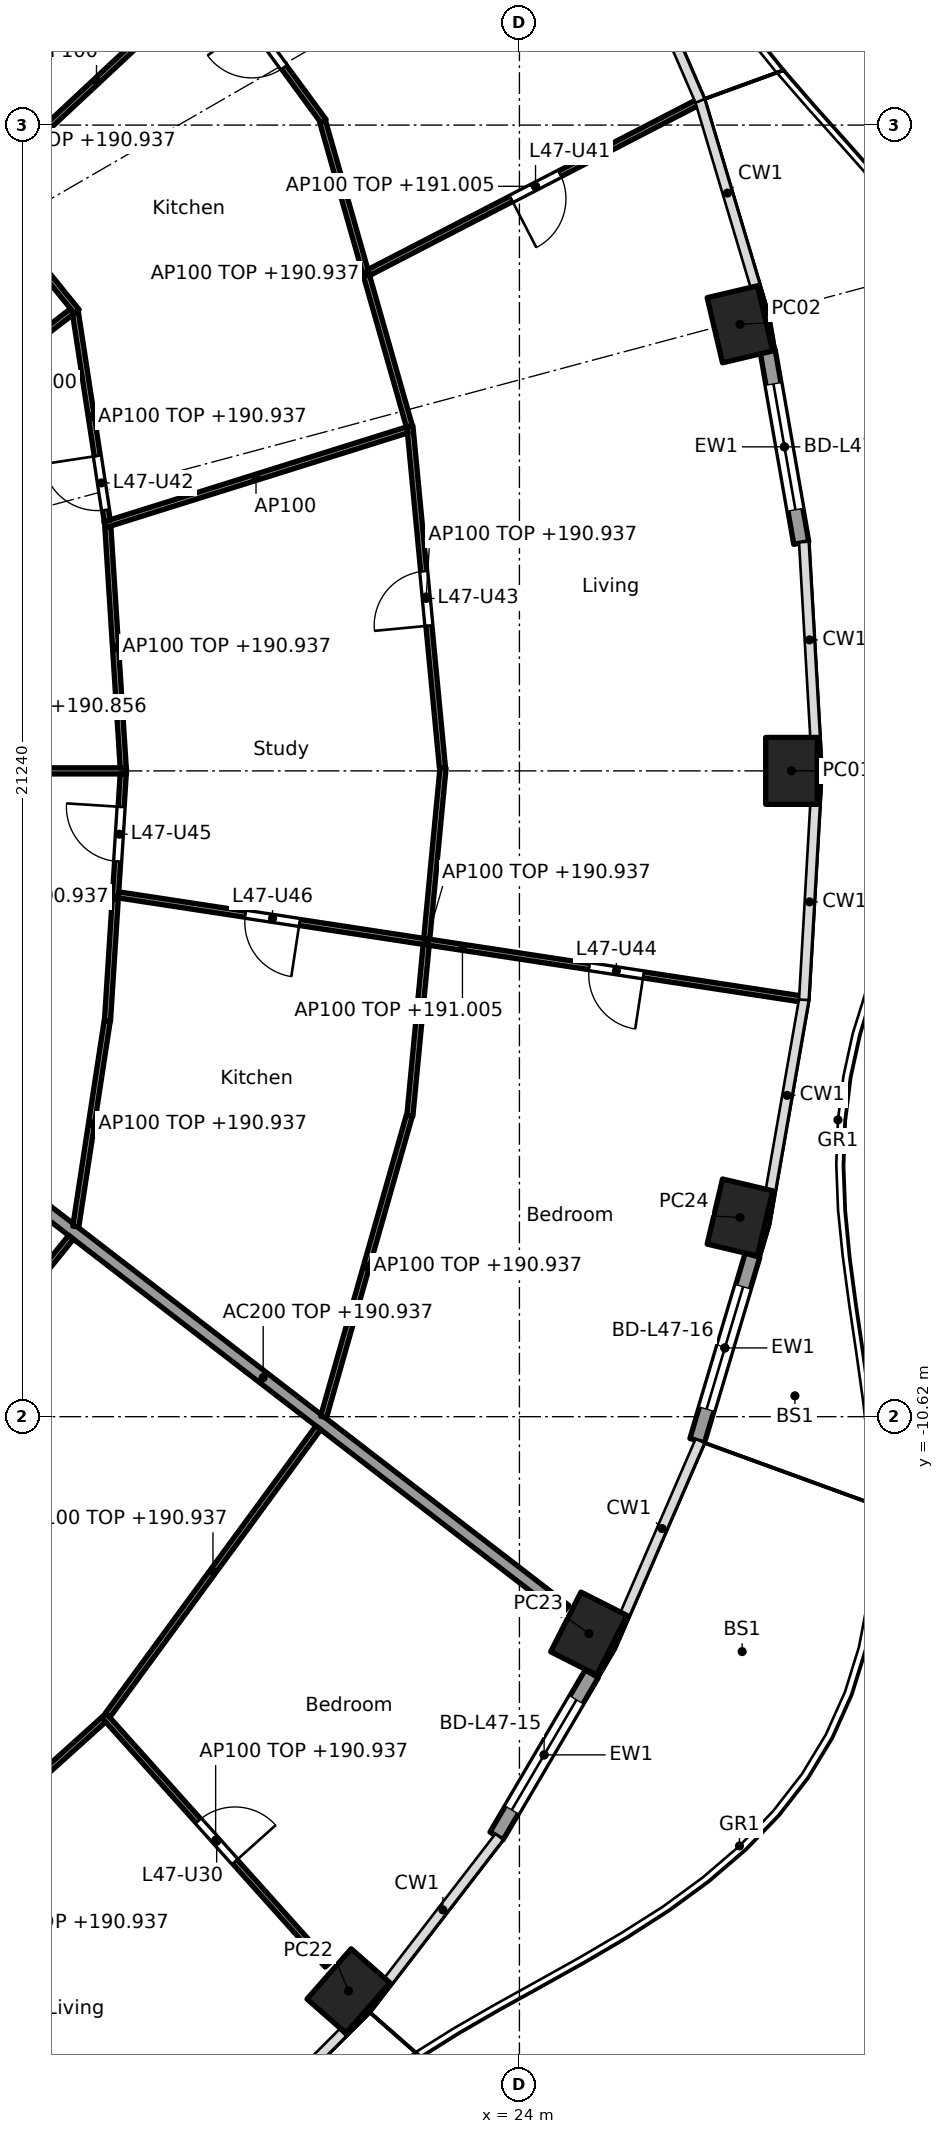
"""IFC4 building model, lengths in metres.
Left out: names, types, materials, properties, quantities, classifications, styles, units other than length and angle.
Written with IfcOpenShell. Run it as: python <this file> out.ifc"""

import sys

from ifc_helpers import new_model, si_unit, direction, frame, frame_2d, origin, origin_2d, place, context, subcontext, project, spatial, rectangle, hollow_rectangle, extrude, element, fill, save


model = new_model("IFC4")
c1 = context("Model", 3, precision=1e-05, world=origin(), true_north=direction((0.0, 1.0)))
c2 = subcontext(c1, "Body", "Model", "MODEL_VIEW")
j1 = project(units=[si_unit("LENGTHUNIT", "METRE"), si_unit("PLANEANGLEUNIT", "RADIAN")], contexts=[c1])
p1 = place(None, origin())
s1 = spatial("IfcSite", under=j1, at=p1, CompositionType="ELEMENT")
p2 = place(p1, origin())
s2 = spatial("IfcBuilding", under=s1, at=p2, CompositionType="ELEMENT")
p3 = place(p2, frame((0.0, 0.0, 188.1)))
s3 = spatial("IfcBuildingStorey", under=s2, at=p3, CompositionType="ELEMENT", Elevation=188.1)
for number, where, z_axis, x_axis in (
    (1, (28.475, 0.0, 0.0), (0.0, 0.0, 1.0), (0.0, 1.0, 0.0)),
    (2, (27.627, 7.344, 0.0), (0.0, 0.0, 1.0), (-0.229, 0.973, 0.0)),
    (3, (21.189, -20.064, 0.0), (0.0, 0.0, 1.0), (0.66, 0.751, 0.0)),
    (4, (25.142, -14.188, 0.0), (0.0, 0.0, 1.0), (0.452, 0.892, 0.0)),
    (5, (27.627, -7.344, 0.0), (0.0, 0.0, 1.0), (0.229, 0.973, 0.0)),
):
    element("IfcColumn", number, at=place(p3, frame(where, z_axis=z_axis, x_axis=x_axis)), inside=s3, PredefinedType="COLUMN", context=c2, shape_type="SweptSolid", body=[
        extrude(hollow_rectangle(XDim=1.1, YDim=0.85, WallThickness=0.036, at=origin_2d()), origin(), (0.0, 0.0, 1.0), 3.7),
    ])
p4 = place(p3, frame((28.082, 6.91, 0.0), z_axis=(0.0, 0.0, 1.0), x_axis=(0.172149769468, -0.985070787747, 0.0)))
e6 = element("IfcWall", 6, at=p4, inside=s3, PredefinedType="SOLIDWALL", context=c2, shape_type="SweptSolid", body=[
    extrude(rectangle(XDim=3.211, YDim=0.25, at=frame_2d((1.605, 0.0))), origin(), (0.0, 0.0, 1.0), 3.44),
])
p5 = place(p4, frame((0.555, 0.0, 0.0)))
e7 = element("IfcOpeningElement", 7, at=p5, cuts=e6, PredefinedType="OPENING", context=c2, shape_type="SweptSolid", body=[
    extrude(rectangle(XDim=2.1, YDim=2.4, at=frame_2d((1.05, 1.2))), frame((0.0, 0.135, 0.0), z_axis=(0.0, -1.0, 0.0), x_axis=(1.0, 0.0, 0.0)), (0.0, 0.0, 1.0), 0.27),
])
p6 = place(p3, frame((25.189, -14.848, 0.0), z_axis=(0.0, 0.0, 1.0), x_axis=(-0.506367803691, -0.862317602386, 0.0)))
e8 = element("IfcWall", 8, at=p6, inside=s3, PredefinedType="SOLIDWALL", context=c2, shape_type="SweptSolid", body=[
    extrude(rectangle(XDim=3.092, YDim=0.25, at=frame_2d((1.546, 0.0))), origin(), (0.0, 0.0, 1.0), 3.44),
])
p7 = place(p6, frame((0.496, 0.0, 0.0)))
e9 = element("IfcOpeningElement", 9, at=p7, cuts=e8, PredefinedType="OPENING", context=c2, shape_type="SweptSolid", body=[
    extrude(rectangle(XDim=2.1, YDim=2.4, at=frame_2d((1.05, 1.2))), frame((0.0, 0.135, 0.0), z_axis=(0.0, -1.0, 0.0), x_axis=(1.0, 0.0, 0.0)), (0.0, 0.0, 1.0), 0.27),
])
p8 = place(p3, frame((27.833, -7.965, 0.0), z_axis=(0.0, 0.0, 1.0), x_axis=(-0.28584838049, -0.958274857946, 0.0)))
e10 = element("IfcWall", 10, at=p8, inside=s3, PredefinedType="SOLIDWALL", context=c2, shape_type="SweptSolid", body=[
    extrude(rectangle(XDim=3.182, YDim=0.25, at=frame_2d((1.591, 0.0))), origin(), (0.0, 0.0, 1.0), 3.44),
])
p9 = place(p8, frame((0.541, 0.0, 0.0)))
e11 = element("IfcOpeningElement", 11, at=p9, cuts=e10, PredefinedType="OPENING", context=c2, shape_type="SweptSolid", body=[
    extrude(rectangle(XDim=2.1, YDim=2.4, at=frame_2d((1.05, 1.2))), frame((0.0, 0.135, 0.0), z_axis=(0.0, -1.0, 0.0), x_axis=(1.0, 0.0, 0.0)), (0.0, 0.0, 1.0), 0.27),
])
p10 = place(p3, frame((14.822, -6.154, 0.0), z_axis=(0.0, 0.0, 1.0), x_axis=(0.792203056092, -0.610257583254, 0.0)))
e12 = element("IfcWall", 12, at=p10, inside=s3, PredefinedType="PARTITIONING", context=c2, shape_type="SweptSolid", body=[
    extrude(rectangle(XDim=12.533, YDim=0.2, at=frame_2d((6.266, 0.0))), origin(), (0.0, 0.0, 1.0), 2.837),
])
p11 = place(p3, frame((12.665, 0.0, 0.0), z_axis=(0.0, 0.0, 1.0), x_axis=(1.0, 0.0, 0.0)))
e13 = element("IfcWall", 13, at=p11, inside=s3, PredefinedType="PARTITIONING", context=c2, shape_type="SweptSolid", body=[
    extrude(rectangle(XDim=4.873, YDim=0.1, at=frame_2d((2.437, 0.0))), origin(), (0.0, 0.0, 1.0), 2.756),
])
p12 = place(p3, frame((17.485, 0.05, 0.0), z_axis=(0.0, 0.0, 1.0), x_axis=(-0.063679314345, 0.99797041285, 0.0)))
e14 = element("IfcWall", 14, at=p12, inside=s3, PredefinedType="PARTITIONING", context=c2, shape_type="SweptSolid", body=[
    extrude(rectangle(XDim=3.972, YDim=0.1, at=frame_2d((1.986, 0.0))), origin(), (0.0, 0.0, 1.0), 2.837),
])
p13 = place(p3, frame((17.485, -0.05, 0.0), z_axis=(0.0, 0.0, 1.0), x_axis=(-0.063673473968, -0.997970785501, 0.0)))
e15 = element("IfcWall", 15, at=p13, inside=s3, PredefinedType="PARTITIONING", context=c2, shape_type="SweptSolid", body=[
    extrude(rectangle(XDim=4.072, YDim=0.1, at=frame_2d((2.036, 0.0))), origin(), (0.0, 0.0, 1.0), 2.837),
])
p14 = place(p13, frame((0.543, 0.0, 0.0)))
e16 = element("IfcOpeningElement", 16, at=p14, cuts=e15, PredefinedType="OPENING", context=c2, shape_type="SweptSolid", body=[
    extrude(rectangle(XDim=0.9, YDim=2.1, at=frame_2d((0.45, 1.05))), frame((0.0, 0.06, 0.0), z_axis=(0.0, -1.0, 0.0), x_axis=(1.0, 0.0, 0.0)), (0.0, 0.0, 1.0), 0.12),
])
p15 = place(p3, frame((22.734, 0.05, 0.0), z_axis=(0.0, 0.0, 1.0), x_axis=(-0.0949274088, 0.995484197292, 0.0)))
e17 = element("IfcWall", 17, at=p15, inside=s3, PredefinedType="PARTITIONING", context=c2, shape_type="SweptSolid", body=[
    extrude(rectangle(XDim=5.648, YDim=0.1, at=frame_2d((2.824, 0.0))), origin(), (0.0, 0.0, 1.0), 2.837),
])
p16 = place(p15, frame((2.349, 0.0, 0.0)))
e18 = element("IfcOpeningElement", 18, at=p16, cuts=e17, PredefinedType="OPENING", context=c2, shape_type="SweptSolid", body=[
    extrude(rectangle(XDim=0.9, YDim=2.1, at=frame_2d((0.45, 1.05))), frame((0.0, 0.06, 0.0), z_axis=(0.0, -1.0, 0.0), x_axis=(1.0, 0.0, 0.0)), (0.0, 0.0, 1.0), 0.12),
])
p17 = place(p3, frame((22.744, 0.05, 0.0), z_axis=(0.0, 0.0, 1.0), x_axis=(-0.094931362305, -0.995483820286, 0.0)))
e19 = element("IfcWall", 19, at=p17, inside=s3, PredefinedType="PARTITIONING", context=c2, shape_type="SweptSolid", body=[
    extrude(rectangle(XDim=5.748, YDim=0.1, at=frame_2d((2.874, 0.0))), origin(), (0.0, 0.0, 1.0), 2.837),
])
p18 = place(p3, frame((17.181, 4.049, 0.0), z_axis=(0.0, 0.0, 1.0), x_axis=(0.954246359918, 0.299021545351, 0.0)))
e20 = element("IfcWall", 20, at=p18, inside=s3, PredefinedType="PARTITIONING", context=c2, shape_type="SweptSolid", body=[
    extrude(rectangle(XDim=5.213, YDim=0.1, at=frame_2d((2.606, 0.0))), origin(), (0.0, 0.0, 1.0), 3.44),
])
p19 = place(p3, frame((17.221, 4.113, 0.0), z_axis=(0.0, 0.0, 1.0), x_axis=(-0.151078880423, 0.988521710379, 0.0)))
e21 = element("IfcWall", 21, at=p19, inside=s3, PredefinedType="PARTITIONING", context=c2, shape_type="SweptSolid", body=[
    extrude(rectangle(XDim=3.469, YDim=0.1, at=frame_2d((1.735, 0.0))), origin(), (0.0, 0.0, 1.0), 2.837),
])
p20 = place(p19, frame((0.18, 0.0, 0.0)))
e22 = element("IfcOpeningElement", 22, at=p20, cuts=e21, PredefinedType="OPENING", context=c2, shape_type="SweptSolid", body=[
    extrude(rectangle(XDim=0.9, YDim=2.1, at=frame_2d((0.45, 1.05))), frame((0.0, 0.06, 0.0), z_axis=(0.0, -1.0, 0.0), x_axis=(1.0, 0.0, 0.0)), (0.0, 0.0, 1.0), 0.12),
])
p21 = place(p3, frame((22.189, 5.67, 0.0), z_axis=(0.0, 0.0, 1.0), x_axis=(-0.273815967041, 0.961782104322, 0.0)))
e23 = element("IfcWall", 23, at=p21, inside=s3, PredefinedType="PARTITIONING", context=c2, shape_type="SweptSolid", body=[
    extrude(rectangle(XDim=5.202, YDim=0.1, at=frame_2d((2.601, 0.0))), origin(), (0.0, 0.0, 1.0), 2.837),
])
p22 = place(p3, frame((21.522, 8.195, 0.0), z_axis=(0.0, 0.0, 1.0), x_axis=(0.888281046031, 0.459300319249, 0.0)))
e24 = element("IfcWall", 24, at=p22, inside=s3, PredefinedType="PARTITIONING", context=c2, shape_type="SweptSolid", body=[
    extrude(rectangle(XDim=6.176, YDim=0.1, at=frame_2d((3.088, 0.0))), origin(), (0.0, 0.0, 1.0), 2.905),
])
p23 = place(p22, frame((2.638, 0.0, 0.0)))
e25 = element("IfcOpeningElement", 25, at=p23, cuts=e24, PredefinedType="OPENING", context=c2, shape_type="SweptSolid", body=[
    extrude(rectangle(XDim=0.9, YDim=2.1, at=frame_2d((0.45, 1.05))), frame((0.0, 0.06, 0.0), z_axis=(0.0, -1.0, 0.0), x_axis=(1.0, 0.0, 0.0)), (0.0, 0.0, 1.0), 0.12),
])
p24 = place(p3, frame((14.822, 6.154, 0.0), z_axis=(0.0, 0.0, 1.0), x_axis=(0.792226528082, 0.610227111987, 0.0)))
e26 = element("IfcWall", 26, at=p24, inside=s3, PredefinedType="PARTITIONING", context=c2, shape_type="SweptSolid", body=[
    extrude(rectangle(XDim=2.307, YDim=0.1, at=frame_2d((1.154, 0.0))), origin(), (0.0, 0.0, 1.0), 3.44),
])
p25 = place(p3, frame((16.721, 7.553, 0.0), z_axis=(0.0, 0.0, 1.0), x_axis=(-0.628753513808, 0.777604667472, 0.0)))
e27 = element("IfcWall", 27, at=p25, inside=s3, PredefinedType="PARTITIONING", context=c2, shape_type="SweptSolid", body=[
    extrude(rectangle(XDim=5.007, YDim=0.1, at=frame_2d((2.504, 0.0))), origin(), (0.0, 0.0, 1.0), 2.837),
])
p26 = place(p3, frame((20.781, 10.681, 0.0), z_axis=(0.0, 0.0, 1.0), x_axis=(-0.591117075283, 0.806585769345, 0.0)))
e28 = element("IfcWall", 28, at=p26, inside=s3, PredefinedType="PARTITIONING", context=c2, shape_type="SweptSolid", body=[
    extrude(rectangle(XDim=6.01, YDim=0.1, at=frame_2d((3.005, 0.0))), origin(), (0.0, 0.0, 1.0), 2.837),
])
p27 = place(p26, frame((1.103, 0.0, 0.0)))
e29 = element("IfcOpeningElement", 29, at=p27, cuts=e28, PredefinedType="OPENING", context=c2, shape_type="SweptSolid", body=[
    extrude(rectangle(XDim=0.9, YDim=2.1, at=frame_2d((0.45, 1.05))), frame((0.0, 0.06, 0.0), z_axis=(0.0, -1.0, 0.0), x_axis=(1.0, 0.0, 0.0)), (0.0, 0.0, 1.0), 0.12),
])
p28 = place(p3, frame((15.152, 9.573, 0.0), z_axis=(0.0, 0.0, 1.0), x_axis=(0.730723083214, 0.682673989294, 0.0)))
e30 = element("IfcWall", 30, at=p28, inside=s3, PredefinedType="PARTITIONING", context=c2, shape_type="SweptSolid", body=[
    extrude(rectangle(XDim=5.183, YDim=0.1, at=frame_2d((2.591, 0.0))), origin(), (0.0, 0.0, 1.0), 3.44),
])
p29 = place(p3, frame((10.178, 7.732, 0.0), z_axis=(0.0, 0.0, 1.0), x_axis=(0.667280084362, 0.744806880348, 0.0)))
e31 = element("IfcWall", 31, at=p29, inside=s3, PredefinedType="PARTITIONING", context=c2, shape_type="SweptSolid", body=[
    extrude(rectangle(XDim=10.572, YDim=0.1, at=frame_2d((5.286, 0.0))), origin(), (0.0, 0.0, 1.0), 2.756),
])
p30 = place(p29, frame((2.07, 0.0, 0.0)))
e32 = element("IfcOpeningElement", 32, at=p30, cuts=e31, PredefinedType="OPENING", context=c2, shape_type="SweptSolid", body=[
    extrude(rectangle(XDim=0.9, YDim=2.1, at=frame_2d((0.45, 1.05))), frame((0.0, 0.06, 0.0), z_axis=(0.0, -1.0, 0.0), x_axis=(1.0, 0.0, 0.0)), (0.0, 0.0, 1.0), 0.12),
])
p31 = place(p29, frame((7.331, 0.0, 0.0)))
e33 = element("IfcOpeningElement", 33, at=p31, cuts=e31, PredefinedType="OPENING", context=c2, shape_type="SweptSolid", body=[
    extrude(rectangle(XDim=0.9, YDim=2.1, at=frame_2d((0.45, 1.05))), frame((0.0, 0.06, 0.0), z_axis=(0.0, -1.0, 0.0), x_axis=(1.0, 0.0, 0.0)), (0.0, 0.0, 1.0), 0.12),
])
p32 = place(p3, frame((12.971, -19.38, 0.0), z_axis=(0.0, 0.0, 1.0), x_axis=(0.742768881471, 0.669547898748, 0.0)))
e34 = element("IfcWall", 34, at=p32, inside=s3, PredefinedType="PARTITIONING", context=c2, shape_type="SweptSolid", body=[
    extrude(rectangle(XDim=5.642, YDim=0.1, at=frame_2d((2.821, 0.0))), origin(), (0.0, 0.0, 1.0), 2.837),
])
p33 = place(p3, frame((13.572, -11.447, 0.0), z_axis=(0.0, 0.0, 1.0), x_axis=(0.628738316533, 0.777616955399, 0.0)))
e35 = element("IfcWall", 35, at=p33, inside=s3, PredefinedType="PARTITIONING", context=c2, shape_type="SweptSolid", body=[
    extrude(rectangle(XDim=4.857, YDim=0.1, at=frame_2d((2.429, 0.0))), origin(), (0.0, 0.0, 1.0), 2.837),
])
p34 = place(p33, frame((1.979, 0.0, 0.0)))
e36 = element("IfcOpeningElement", 36, at=p34, cuts=e35, PredefinedType="OPENING", context=c2, shape_type="SweptSolid", body=[
    extrude(rectangle(XDim=0.9, YDim=2.1, at=frame_2d((0.45, 1.05))), frame((0.0, 0.06, 0.0), z_axis=(0.0, -1.0, 0.0), x_axis=(1.0, 0.0, 0.0)), (0.0, 0.0, 1.0), 0.12),
])
p35 = place(p3, frame((17.166, -15.532, 0.0), z_axis=(0.0, 0.0, 1.0), x_axis=(0.66728415915, -0.744803229684, 0.0)))
e37 = element("IfcWall", 37, at=p35, inside=s3, PredefinedType="PARTITIONING", context=c2, shape_type="SweptSolid", body=[
    extrude(rectangle(XDim=5.511, YDim=0.1, at=frame_2d((2.756, 0.0))), origin(), (0.0, 0.0, 1.0), 2.837),
])
p36 = place(p35, frame((2.331, 0.0, 0.0)))
e38 = element("IfcOpeningElement", 38, at=p36, cuts=e37, PredefinedType="OPENING", context=c2, shape_type="SweptSolid", body=[
    extrude(rectangle(XDim=0.9, YDim=2.1, at=frame_2d((0.45, 1.05))), frame((0.0, 0.06, 0.0), z_axis=(0.0, -1.0, 0.0), x_axis=(1.0, 0.0, 0.0)), (0.0, 0.0, 1.0), 0.12),
])
p37 = place(p3, frame((17.229, -15.529, 0.0), z_axis=(0.0, 0.0, 1.0), x_axis=(0.591110768293, 0.806590391468, 0.0)))
e39 = element("IfcWall", 39, at=p37, inside=s3, PredefinedType="PARTITIONING", context=c2, shape_type="SweptSolid", body=[
    extrude(rectangle(XDim=5.86, YDim=0.1, at=frame_2d((2.93, 0.0))), origin(), (0.0, 0.0, 1.0), 2.837),
])
p38 = place(p3, frame((16.704, -7.493, 0.0), z_axis=(0.0, 0.0, 1.0), x_axis=(0.1510806336, 0.988521442434, 0.0)))
e40 = element("IfcWall", 40, at=p38, inside=s3, PredefinedType="PARTITIONING", context=c2, shape_type="SweptSolid", body=[
    extrude(rectangle(XDim=3.419, YDim=0.1, at=frame_2d((1.71, 0.0))), origin(), (0.0, 0.0, 1.0), 2.837),
])
p39 = place(p3, frame((20.779, -10.625, 0.0), z_axis=(0.0, 0.0, 1.0), x_axis=(0.273819702124, 0.961781040949, 0.0)))
e41 = element("IfcWall", 41, at=p39, inside=s3, PredefinedType="PARTITIONING", context=c2, shape_type="SweptSolid", body=[
    extrude(rectangle(XDim=5.152, YDim=0.1, at=frame_2d((2.576, 0.0))), origin(), (0.0, 0.0, 1.0), 2.837),
])
p40 = place(p3, frame((17.407, -2.039, 0.0), z_axis=(0.0, 0.0, 1.0), x_axis=(0.98858728603, -0.150649188184, 0.0)))
e42 = element("IfcWall", 42, at=p40, inside=s3, PredefinedType="PARTITIONING", context=c2, shape_type="SweptSolid", body=[
    extrude(rectangle(XDim=11.441, YDim=0.1, at=frame_2d((5.721, 0.0))), origin(), (0.0, 0.0, 1.0), 2.905),
])
p41 = place(p40, frame((7.832, 0.0, 0.0)))
e43 = element("IfcOpeningElement", 43, at=p41, cuts=e42, PredefinedType="OPENING", context=c2, shape_type="SweptSolid", body=[
    extrude(rectangle(XDim=0.9, YDim=2.1, at=frame_2d((0.45, 1.05))), frame((0.0, 0.06, 0.0), z_axis=(0.0, -1.0, 0.0), x_axis=(1.0, 0.0, 0.0)), (0.0, 0.0, 1.0), 0.12),
])
p42 = place(p40, frame((2.111, 0.0, 0.0)))
e44 = element("IfcOpeningElement", 44, at=p42, cuts=e42, PredefinedType="OPENING", context=c2, shape_type="SweptSolid", body=[
    extrude(rectangle(XDim=0.9, YDim=2.1, at=frame_2d((0.45, 1.05))), frame((0.0, 0.06, 0.0), z_axis=(0.0, -1.0, 0.0), x_axis=(1.0, 0.0, 0.0)), (0.0, 0.0, 1.0), 0.12),
])
p43 = place(p5, origin())
e45 = element("IfcDoor", 45, at=p43, inside=s3, OperationType="SLIDING_TO_LEFT", PredefinedType="DOOR", context=c2, shape_type="SweptSolid", body=[
    extrude(rectangle(XDim=2.1, YDim=2.4, at=frame_2d((1.05, 1.2))), frame((0.0, 0.025, 0.0), z_axis=(0.0, -1.0, 0.0), x_axis=(1.0, 0.0, 0.0)), (0.0, 0.0, 1.0), 0.05),
])
fill(e7, e45)
p44 = place(p7, origin())
e46 = element("IfcDoor", 46, at=p44, inside=s3, OperationType="SLIDING_TO_LEFT", PredefinedType="DOOR", context=c2, shape_type="SweptSolid", body=[
    extrude(rectangle(XDim=2.1, YDim=2.4, at=frame_2d((1.05, 1.2))), frame((0.0, 0.025, 0.0), z_axis=(0.0, -1.0, 0.0), x_axis=(1.0, 0.0, 0.0)), (0.0, 0.0, 1.0), 0.05),
])
fill(e9, e46)
p45 = place(p9, origin())
e47 = element("IfcDoor", 47, at=p45, inside=s3, OperationType="SLIDING_TO_LEFT", PredefinedType="DOOR", context=c2, shape_type="SweptSolid", body=[
    extrude(rectangle(XDim=2.1, YDim=2.4, at=frame_2d((1.05, 1.2))), frame((0.0, 0.025, 0.0), z_axis=(0.0, -1.0, 0.0), x_axis=(1.0, 0.0, 0.0)), (0.0, 0.0, 1.0), 0.05),
])
fill(e11, e47)
p46 = place(p36, origin())
e48 = element("IfcDoor", 48, at=p46, inside=s3, OperationType="SINGLE_SWING_RIGHT", PredefinedType="DOOR", context=c2, shape_type="SweptSolid", body=[
    extrude(rectangle(XDim=0.9, YDim=2.1, at=frame_2d((0.45, 1.05))), frame((0.0, 0.025, 0.0), z_axis=(0.0, -1.0, 0.0), x_axis=(1.0, 0.0, 0.0)), (0.0, 0.0, 1.0), 0.05),
])
fill(e38, e48)
p47 = place(p27, origin())
e49 = element("IfcDoor", 49, at=p47, inside=s3, OperationType="SINGLE_SWING_RIGHT", PredefinedType="DOOR", context=c2, shape_type="SweptSolid", body=[
    extrude(rectangle(XDim=0.9, YDim=2.1, at=frame_2d((0.45, 1.05))), frame((0.0, 0.025, 0.0), z_axis=(0.0, -1.0, 0.0), x_axis=(1.0, 0.0, 0.0)), (0.0, 0.0, 1.0), 0.05),
])
fill(e29, e49)
p48 = place(p23, frame((0.9, 0.0, 0.0), x_axis=(-1.0, 0.0, 0.0)))
e50 = element("IfcDoor", 50, at=p48, inside=s3, OperationType="SINGLE_SWING_RIGHT", PredefinedType="DOOR", context=c2, shape_type="SweptSolid", body=[
    extrude(rectangle(XDim=0.9, YDim=2.1, at=frame_2d((0.45, 1.05))), frame((0.0, 0.025, 0.0), z_axis=(0.0, -1.0, 0.0), x_axis=(1.0, 0.0, 0.0)), (0.0, 0.0, 1.0), 0.05),
])
fill(e25, e50)
p49 = place(p20, origin())
e51 = element("IfcDoor", 51, at=p49, inside=s3, OperationType="SINGLE_SWING_RIGHT", PredefinedType="DOOR", context=c2, shape_type="SweptSolid", body=[
    extrude(rectangle(XDim=0.9, YDim=2.1, at=frame_2d((0.45, 1.05))), frame((0.0, 0.025, 0.0), z_axis=(0.0, -1.0, 0.0), x_axis=(1.0, 0.0, 0.0)), (0.0, 0.0, 1.0), 0.05),
])
fill(e22, e51)
p50 = place(p16, origin())
e52 = element("IfcDoor", 52, at=p50, inside=s3, OperationType="SINGLE_SWING_LEFT", PredefinedType="DOOR", context=c2, shape_type="SweptSolid", body=[
    extrude(rectangle(XDim=0.9, YDim=2.1, at=frame_2d((0.45, 1.05))), frame((0.0, 0.025, 0.0), z_axis=(0.0, -1.0, 0.0), x_axis=(1.0, 0.0, 0.0)), (0.0, 0.0, 1.0), 0.05),
])
fill(e18, e52)
p51 = place(p41, frame((0.9, 0.0, 0.0), x_axis=(-1.0, 0.0, 0.0)))
e53 = element("IfcDoor", 53, at=p51, inside=s3, OperationType="SINGLE_SWING_LEFT", PredefinedType="DOOR", context=c2, shape_type="SweptSolid", body=[
    extrude(rectangle(XDim=0.9, YDim=2.1, at=frame_2d((0.45, 1.05))), frame((0.0, 0.025, 0.0), z_axis=(0.0, -1.0, 0.0), x_axis=(1.0, 0.0, 0.0)), (0.0, 0.0, 1.0), 0.05),
])
fill(e43, e53)
p52 = place(p14, frame((0.9, 0.0, 0.0), x_axis=(-1.0, 0.0, 0.0)))
e54 = element("IfcDoor", 54, at=p52, inside=s3, OperationType="SINGLE_SWING_RIGHT", PredefinedType="DOOR", context=c2, shape_type="SweptSolid", body=[
    extrude(rectangle(XDim=0.9, YDim=2.1, at=frame_2d((0.45, 1.05))), frame((0.0, 0.025, 0.0), z_axis=(0.0, -1.0, 0.0), x_axis=(1.0, 0.0, 0.0)), (0.0, 0.0, 1.0), 0.05),
])
fill(e16, e54)
p53 = place(p42, frame((0.9, 0.0, 0.0), x_axis=(-1.0, 0.0, 0.0)))
e55 = element("IfcDoor", 55, at=p53, inside=s3, OperationType="SINGLE_SWING_LEFT", PredefinedType="DOOR", context=c2, shape_type="SweptSolid", body=[
    extrude(rectangle(XDim=0.9, YDim=2.1, at=frame_2d((0.45, 1.05))), frame((0.0, 0.025, 0.0), z_axis=(0.0, -1.0, 0.0), x_axis=(1.0, 0.0, 0.0)), (0.0, 0.0, 1.0), 0.05),
])
fill(e44, e55)
save(model, sys.argv[1])
